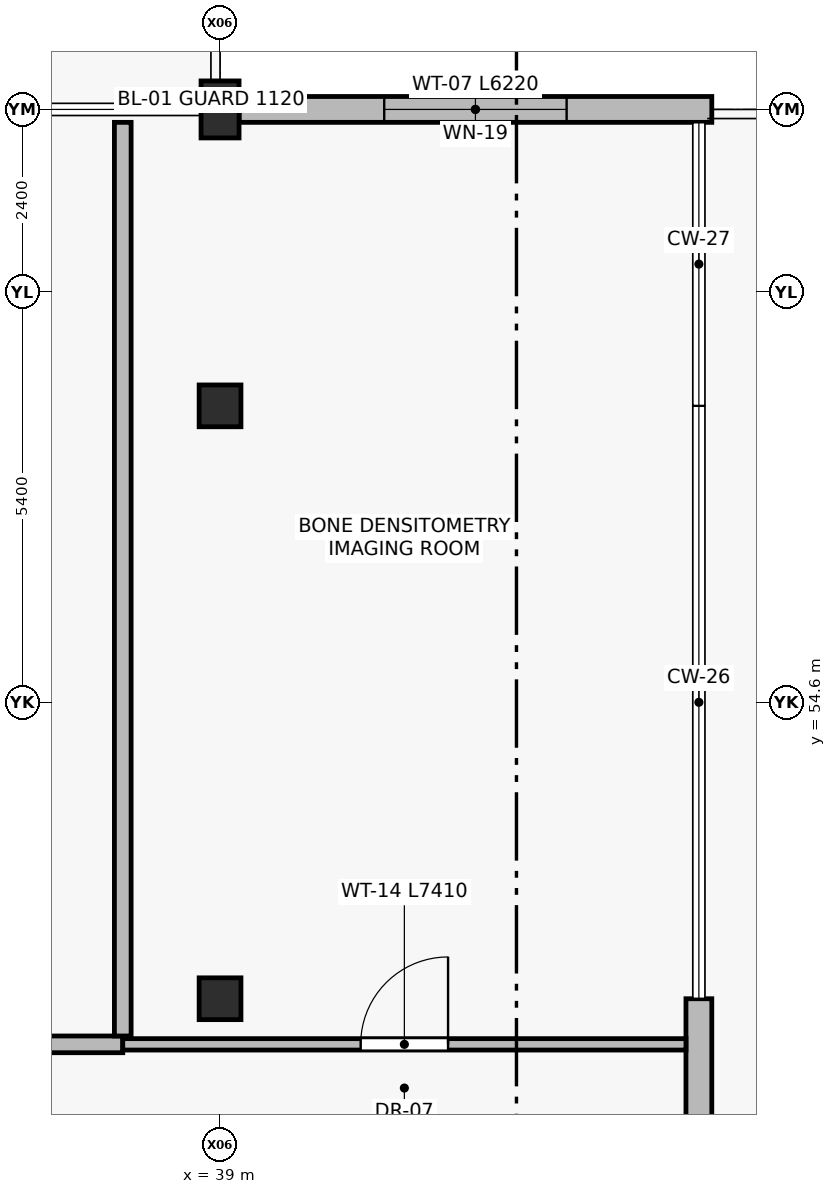
"""IFC4 building model, lengths in metres.
Left out: names, types, materials, properties, quantities, classifications, styles, units other than length and angle.
Written with IfcOpenShell. Run it as: python <this file> out.ifc"""

import sys

from ifc_helpers import new_model, si_unit, direction, frame, frame_2d, origin, origin_2d, place, context, subcontext, project, spatial, rectangle, extrude, element, fill, save


model = new_model("IFC4")
c1 = context("Model", 3, precision=1e-05, world=origin(), true_north=direction((0.0, 1.0)))
c2 = subcontext(c1, "Body", "Model", "MODEL_VIEW")
j1 = project(units=[si_unit("LENGTHUNIT", "METRE"), si_unit("PLANEANGLEUNIT", "RADIAN")], contexts=[c1])
p1 = place(None, origin())
s1 = spatial("IfcSite", under=j1, at=p1, CompositionType="ELEMENT")
p2 = place(p1, origin())
s2 = spatial("IfcBuilding", under=s1, at=p2, CompositionType="ELEMENT")
p3 = place(p2, frame((0.0, 0.0, 4.8)))
s3 = spatial("IfcBuildingStorey", under=s2, at=p3, CompositionType="ELEMENT", Elevation=4.8)
for number, where, z_axis, x_axis in (
    (1, (39.0, 50.7, 0.0), (0.0, 0.0, 1.0), (1.0, 0.0, 0.0)),
    (2, (39.0, 58.5, 0.0), (0.0, 0.0, 1.0), (1.0, 0.0, 0.0)),
):
    element("IfcColumn", number, at=place(p3, frame(where, z_axis=z_axis, x_axis=x_axis)), inside=s3, PredefinedType="COLUMN", context=c2, shape_type="SweptSolid", body=[
        extrude(rectangle(XDim=0.55, YDim=0.55, at=origin_2d()), origin(), (0.0, 0.0, 1.0), 4.8),
    ])
p4 = place(p3, frame((39.0, 62.4, 0.0), z_axis=(0.0, 0.0, 1.0), x_axis=(1.0, 0.0, 0.0)))
e3 = element("IfcColumn", 3, at=p4, inside=s3, PredefinedType="COLUMN", context=c2, shape_type="SweptSolid", body=[
    extrude(rectangle(XDim=0.5, YDim=0.75, at=origin_2d()), origin(), (0.0, 0.0, 1.0), 4.8),
])
p5 = place(p3, frame((39.25, 62.4, 0.0), z_axis=(0.0, 0.0, 1.0), x_axis=(1.0, 0.0, 0.0)))
e4 = element("IfcWall", 4, at=p5, inside=s3, PredefinedType="STANDARD", context=c2, shape_type="SweptSolid", body=[
    extrude(rectangle(XDim=6.22, YDim=0.34, at=frame_2d((3.11, 0.0))), origin(), (0.0, 0.0, 1.0), 4.14),
])
p6 = place(p5, frame((1.91, 0.0, 0.9)))
e5 = element("IfcOpeningElement", 5, at=p6, cuts=e4, PredefinedType="OPENING", context=c2, shape_type="SweptSolid", body=[
    extrude(rectangle(XDim=2.4, YDim=2.0, at=frame_2d((1.2, 1.0))), frame((0.0, 0.18, 0.0), z_axis=(0.0, -1.0, 0.0), x_axis=(1.0, 0.0, 0.0)), (0.0, 0.0, 1.0), 0.36),
])
p7 = place(p3, frame((45.3, 50.7, 0.0), z_axis=(0.0, 0.0, 1.0), x_axis=(0.0, -1.0, 0.0)))
e6 = element("IfcWall", 6, at=p7, inside=s3, PredefinedType="STANDARD", context=c2, shape_type="SweptSolid", body=[
    extrude(rectangle(XDim=7.8, YDim=0.34, at=frame_2d((3.9, 0.0))), origin(), (0.0, 0.0, 1.0), 4.54),
])
p8 = place(p7, frame((1.575, 0.0, 0.0)))
e7 = element("IfcOpeningElement", 7, at=p8, cuts=e6, PredefinedType="OPENING", context=c2, shape_type="SweptSolid", body=[
    extrude(rectangle(XDim=1.25, YDim=2.2, at=frame_2d((0.625, 1.1))), frame((0.0, 0.18, 0.0), z_axis=(0.0, -1.0, 0.0), x_axis=(1.0, 0.0, 0.0)), (0.0, 0.0, 1.0), 0.36),
])
p9 = place(p3, frame((31.32, 50.1, 0.0), z_axis=(0.0, 0.0, 1.0), x_axis=(1.0, 0.0, 0.0)))
e8 = element("IfcWall", 8, at=p9, inside=s3, PredefinedType="PARTITIONING", context=c2, shape_type="SweptSolid", body=[
    extrude(rectangle(XDim=6.4, YDim=0.22, at=frame_2d((3.2, 0.0))), origin(), (0.0, 0.0, 1.0), 4.54),
])
p10 = place(p9, frame((2.65, 0.0, 0.0)))
e9 = element("IfcOpeningElement", 9, at=p10, cuts=e8, PredefinedType="OPENING", context=c2, shape_type="SweptSolid", body=[
    extrude(rectangle(XDim=1.1, YDim=2.15, at=frame_2d((0.55, 1.075))), frame((0.0, 0.12, 0.0), z_axis=(0.0, -1.0, 0.0), x_axis=(1.0, 0.0, 0.0)), (0.0, 0.0, 1.0), 0.24),
])
p11 = place(p3, frame((37.72, 50.1, 0.0), z_axis=(0.0, 0.0, 1.0), x_axis=(1.0, 0.0, 0.0)))
e10 = element("IfcWall", 10, at=p11, inside=s3, PredefinedType="PARTITIONING", context=c2, shape_type="SweptSolid", body=[
    extrude(rectangle(XDim=7.41, YDim=0.15, at=frame_2d((3.705, 0.0))), origin(), (0.0, 0.0, 1.0), 4.54),
])
p12 = place(p11, frame((3.13, 0.0, 0.0)))
e11 = element("IfcOpeningElement", 11, at=p12, cuts=e10, PredefinedType="OPENING", context=c2, shape_type="SweptSolid", body=[
    extrude(rectangle(XDim=1.15, YDim=2.2, at=frame_2d((0.575, 1.1))), frame((0.0, 0.085, 0.0), z_axis=(0.0, -1.0, 0.0), x_axis=(1.0, 0.0, 0.0)), (0.0, 0.0, 1.0), 0.17),
])
p13 = place(p3, frame((37.72, 50.21, 0.0), z_axis=(0.0, 0.0, 1.0), x_axis=(0.0, 1.0, 0.0)))
e12 = element("IfcWall", 12, at=p13, inside=s3, PredefinedType="PARTITIONING", context=c2, shape_type="SweptSolid", body=[
    extrude(rectangle(XDim=12.02, YDim=0.22, at=frame_2d((6.01, 0.0))), origin(), (0.0, 0.0, 1.0), 4.54),
])
p14 = place(p6, origin())
e13 = element("IfcWindow", 13, at=p14, inside=s3, PartitioningType="SINGLE_PANEL", PredefinedType="WINDOW", context=c2, shape_type="SweptSolid", body=[
    extrude(rectangle(XDim=2.4, YDim=2.0, at=frame_2d((1.2, 1.0))), frame((0.0, 0.03, 0.0), z_axis=(0.0, -1.0, 0.0), x_axis=(1.0, 0.0, 0.0)), (0.0, 0.0, 1.0), 0.06),
])
fill(e5, e13)
p15 = place(p12, origin())
e14 = element("IfcDoor", 14, at=p15, inside=s3, OperationType="SINGLE_SWING_RIGHT", PredefinedType="DOOR", context=c2, shape_type="SweptSolid", body=[
    extrude(rectangle(XDim=1.15, YDim=2.2, at=frame_2d((0.575, 1.1))), frame((0.0, 0.025, 0.0), z_axis=(0.0, -1.0, 0.0), x_axis=(1.0, 0.0, 0.0)), (0.0, 0.0, 1.0), 0.05),
])
fill(e11, e14)
save(model, sys.argv[1])
